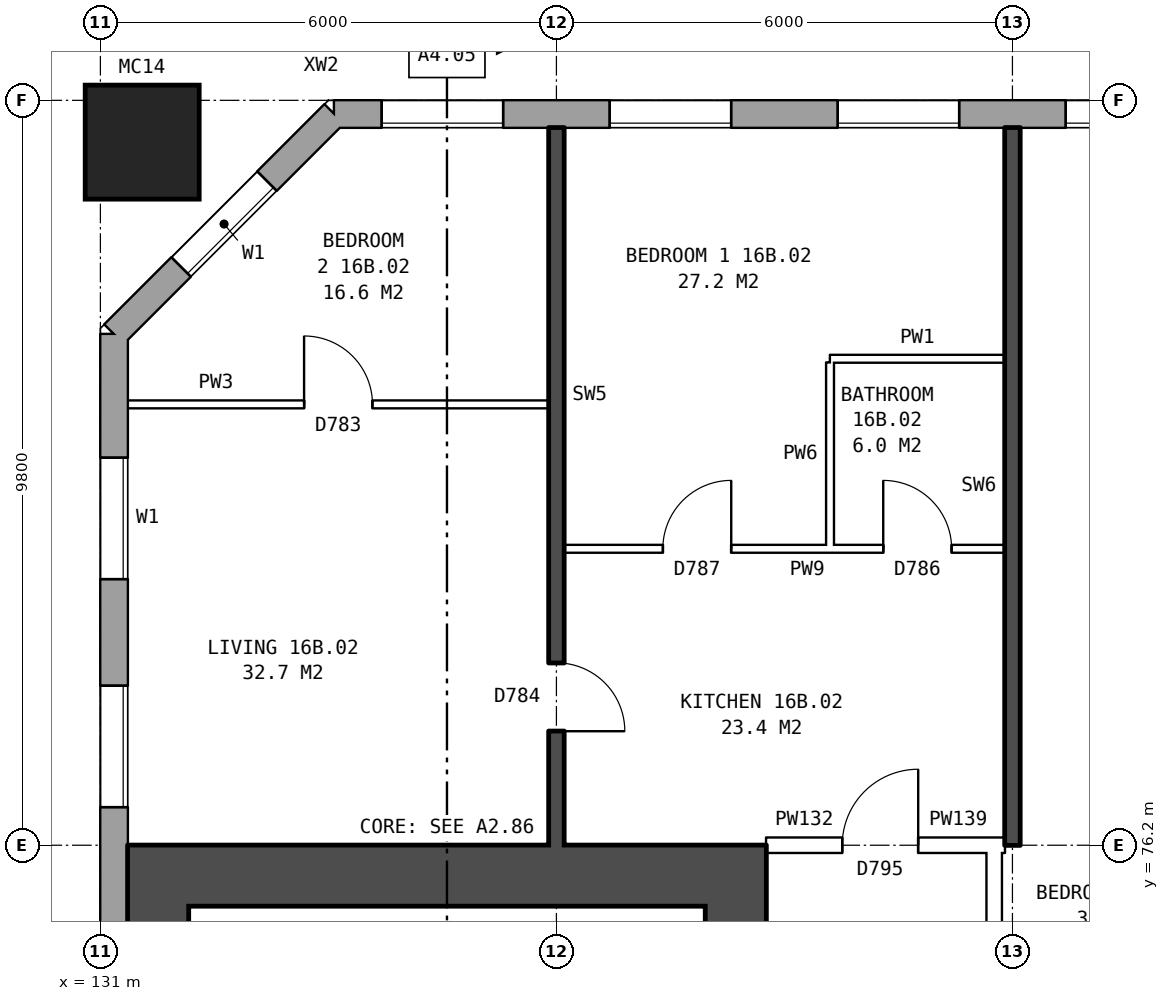
"""IFC4 building model, lengths in metres.
Left out: names, types, materials, properties, quantities, classifications, styles, units other than length and angle.
Written with IfcOpenShell. Run it as: python <this file> out.ifc"""

import sys

from ifc_helpers import new_model, si_unit, direction, frame, frame_2d, origin, origin_2d, place, context, subcontext, project, spatial, rectangle, hollow_rectangle, extrude, element, fill, save


model = new_model("IFC4")
c1 = context("Model", 3, precision=1e-05, world=origin(), true_north=direction((0.0, 1.0)))
c2 = subcontext(c1, "Body", "Model", "MODEL_VIEW")
j1 = project(units=[si_unit("LENGTHUNIT", "METRE"), si_unit("PLANEANGLEUNIT", "RADIAN")], contexts=[c1])
p1 = place(None, origin())
s1 = spatial("IfcSite", under=j1, at=p1, CompositionType="ELEMENT")
p2 = place(p1, origin())
s2 = spatial("IfcBuilding", under=s1, at=p2, CompositionType="ELEMENT")
p3 = place(p2, frame((0.0, 0.0, 59.8)))
s3 = spatial("IfcBuildingStorey", under=s2, at=p3, CompositionType="ELEMENT", Elevation=59.8)
p4 = place(p3, frame((131.55, 85.45, 0.0), z_axis=(0.0, 0.0, 1.0), x_axis=(1.0, 0.0, 0.0)))
e1 = element("IfcColumn", 1, at=p4, inside=s3, PredefinedType="COLUMN", context=c2, shape_type="SweptSolid", body=[
    extrude(hollow_rectangle(XDim=1.5, YDim=1.5, WallThickness=0.08, at=origin_2d()), origin(), (0.0, 0.0, 1.0), 3.1),
])
p5 = place(p3, frame((173.425, 85.82, 0.0), z_axis=(0.0, 0.0, 1.0), x_axis=(-1.0, 0.0, 0.0)))
e2 = element("IfcWall", 2, at=p5, inside=s3, PredefinedType="STANDARD", context=c2, shape_type="SweptSolid", body=[
    extrude(rectangle(XDim=39.351, YDim=0.36, at=frame_2d((19.675, 0.0))), origin(), (0.0, 0.0, 1.0), 2.85),
])
p6 = place(p5, frame((1.125, 0.0, 0.8)))
e3 = element("IfcOpeningElement", 3, at=p6, cuts=e2, PredefinedType="OPENING", context=c2, shape_type="SweptSolid", body=[
    extrude(rectangle(XDim=1.6, YDim=1.8, at=frame_2d((0.8, 0.9))), frame((0.0, 0.19, 0.0), z_axis=(0.0, -1.0, 0.0), x_axis=(1.0, 0.0, 0.0)), (0.0, 0.0, 1.0), 0.38),
])
p7 = place(p5, frame((4.125, 0.0, 0.8)))
e4 = element("IfcOpeningElement", 4, at=p7, cuts=e2, PredefinedType="OPENING", context=c2, shape_type="SweptSolid", body=[
    extrude(rectangle(XDim=1.6, YDim=1.8, at=frame_2d((0.8, 0.9))), frame((0.0, 0.19, 0.0), z_axis=(0.0, -1.0, 0.0), x_axis=(1.0, 0.0, 0.0)), (0.0, 0.0, 1.0), 0.38),
])
p8 = place(p5, frame((7.125, 0.0, 0.8)))
e5 = element("IfcOpeningElement", 5, at=p8, cuts=e2, PredefinedType="OPENING", context=c2, shape_type="SweptSolid", body=[
    extrude(rectangle(XDim=1.6, YDim=1.8, at=frame_2d((0.8, 0.9))), frame((0.0, 0.19, 0.0), z_axis=(0.0, -1.0, 0.0), x_axis=(1.0, 0.0, 0.0)), (0.0, 0.0, 1.0), 0.38),
])
p9 = place(p5, frame((10.125, 0.0, 0.8)))
e6 = element("IfcOpeningElement", 6, at=p9, cuts=e2, PredefinedType="OPENING", context=c2, shape_type="SweptSolid", body=[
    extrude(rectangle(XDim=1.6, YDim=1.8, at=frame_2d((0.8, 0.9))), frame((0.0, 0.19, 0.0), z_axis=(0.0, -1.0, 0.0), x_axis=(1.0, 0.0, 0.0)), (0.0, 0.0, 1.0), 0.38),
])
p10 = place(p5, frame((13.125, 0.0, 0.8)))
e7 = element("IfcOpeningElement", 7, at=p10, cuts=e2, PredefinedType="OPENING", context=c2, shape_type="SweptSolid", body=[
    extrude(rectangle(XDim=1.6, YDim=1.8, at=frame_2d((0.8, 0.9))), frame((0.0, 0.19, 0.0), z_axis=(0.0, -1.0, 0.0), x_axis=(1.0, 0.0, 0.0)), (0.0, 0.0, 1.0), 0.38),
])
p11 = place(p5, frame((15.025, 0.0, 0.8)))
e8 = element("IfcOpeningElement", 8, at=p11, cuts=e2, PredefinedType="OPENING", context=c2, shape_type="SweptSolid", body=[
    extrude(rectangle(XDim=1.0, YDim=1.8, at=frame_2d((0.5, 0.9))), frame((0.0, 0.19, 0.0), z_axis=(0.0, -1.0, 0.0), x_axis=(1.0, 0.0, 0.0)), (0.0, 0.0, 1.0), 0.38),
])
p12 = place(p5, frame((18.625, 0.0, 0.15)))
e9 = element("IfcOpeningElement", 9, at=p12, cuts=e2, PredefinedType="OPENING", context=c2, shape_type="SweptSolid", body=[
    extrude(rectangle(XDim=1.4, YDim=1.2, at=frame_2d((0.7, 0.6))), frame((0.0, 0.19, 0.0), z_axis=(0.0, -1.0, 0.0), x_axis=(1.0, 0.0, 0.0)), (0.0, 0.0, 1.0), 0.38),
])
p13 = place(p5, frame((21.575, 0.0, 1.7)))
e10 = element("IfcOpeningElement", 10, at=p13, cuts=e2, PredefinedType="OPENING", context=c2, shape_type="SweptSolid", body=[
    extrude(rectangle(XDim=0.6, YDim=0.9, at=frame_2d((0.3, 0.45))), frame((0.0, 0.19, 0.0), z_axis=(0.0, -1.0, 0.0), x_axis=(1.0, 0.0, 0.0)), (0.0, 0.0, 1.0), 0.38),
])
p14 = place(p5, frame((25.125, 0.0, 0.8)))
e11 = element("IfcOpeningElement", 11, at=p14, cuts=e2, PredefinedType="OPENING", context=c2, shape_type="SweptSolid", body=[
    extrude(rectangle(XDim=1.6, YDim=1.8, at=frame_2d((0.8, 0.9))), frame((0.0, 0.19, 0.0), z_axis=(0.0, -1.0, 0.0), x_axis=(1.0, 0.0, 0.0)), (0.0, 0.0, 1.0), 0.38),
])
p15 = place(p5, frame((28.125, 0.0, 0.8)))
e12 = element("IfcOpeningElement", 12, at=p15, cuts=e2, PredefinedType="OPENING", context=c2, shape_type="SweptSolid", body=[
    extrude(rectangle(XDim=1.6, YDim=1.8, at=frame_2d((0.8, 0.9))), frame((0.0, 0.19, 0.0), z_axis=(0.0, -1.0, 0.0), x_axis=(1.0, 0.0, 0.0)), (0.0, 0.0, 1.0), 0.38),
])
p16 = place(p5, frame((31.125, 0.0, 0.8)))
e13 = element("IfcOpeningElement", 13, at=p16, cuts=e2, PredefinedType="OPENING", context=c2, shape_type="SweptSolid", body=[
    extrude(rectangle(XDim=1.6, YDim=1.8, at=frame_2d((0.8, 0.9))), frame((0.0, 0.19, 0.0), z_axis=(0.0, -1.0, 0.0), x_axis=(1.0, 0.0, 0.0)), (0.0, 0.0, 1.0), 0.38),
])
p17 = place(p5, frame((34.125, 0.0, 0.8)))
e14 = element("IfcOpeningElement", 14, at=p17, cuts=e2, PredefinedType="OPENING", context=c2, shape_type="SweptSolid", body=[
    extrude(rectangle(XDim=1.6, YDim=1.8, at=frame_2d((0.8, 0.9))), frame((0.0, 0.19, 0.0), z_axis=(0.0, -1.0, 0.0), x_axis=(1.0, 0.0, 0.0)), (0.0, 0.0, 1.0), 0.38),
])
p18 = place(p5, frame((37.125, 0.0, 0.8)))
e15 = element("IfcOpeningElement", 15, at=p18, cuts=e2, PredefinedType="OPENING", context=c2, shape_type="SweptSolid", body=[
    extrude(rectangle(XDim=1.6, YDim=1.8, at=frame_2d((0.8, 0.9))), frame((0.0, 0.19, 0.0), z_axis=(0.0, -1.0, 0.0), x_axis=(1.0, 0.0, 0.0)), (0.0, 0.0, 1.0), 0.38),
])
p19 = place(p5, frame((16.325, 0.0, 1.0)))
e16 = element("IfcOpeningElement", 16, at=p19, cuts=e2, PredefinedType="OPENING", context=c2, shape_type="SweptSolid", body=[
    extrude(rectangle(XDim=0.6, YDim=1.5, at=frame_2d((0.3, 0.75))), frame((0.0, 0.19, 0.0), z_axis=(0.0, -1.0, 0.0), x_axis=(1.0, 0.0, 0.0)), (0.0, 0.0, 1.0), 0.38),
])
p20 = place(p5, frame((17.225, 0.0, 1.7)))
e17 = element("IfcOpeningElement", 17, at=p20, cuts=e2, PredefinedType="OPENING", context=c2, shape_type="SweptSolid", body=[
    extrude(rectangle(XDim=0.6, YDim=0.9, at=frame_2d((0.3, 0.45))), frame((0.0, 0.19, 0.0), z_axis=(0.0, -1.0, 0.0), x_axis=(1.0, 0.0, 0.0)), (0.0, 0.0, 1.0), 0.38),
])
p21 = place(p5, frame((20.325, 0.0, 0.25)))
e18 = element("IfcOpeningElement", 18, at=p21, cuts=e2, PredefinedType="OPENING", context=c2, shape_type="SweptSolid", body=[
    extrude(rectangle(XDim=0.6, YDim=0.9, at=frame_2d((0.3, 0.45))), frame((0.0, 0.19, 0.0), z_axis=(0.0, -1.0, 0.0), x_axis=(1.0, 0.0, 0.0)), (0.0, 0.0, 1.0), 0.38),
])
p22 = place(p5, frame((22.625, 0.0, 0.8)))
e19 = element("IfcOpeningElement", 19, at=p22, cuts=e2, PredefinedType="OPENING", context=c2, shape_type="SweptSolid", body=[
    extrude(rectangle(XDim=1.6, YDim=1.8, at=frame_2d((0.8, 0.9))), frame((0.0, 0.19, 0.0), z_axis=(0.0, -1.0, 0.0), x_axis=(1.0, 0.0, 0.0)), (0.0, 0.0, 1.0), 0.38),
])
p23 = place(p3, frame((134.075, 85.82, 0.0), z_axis=(0.0, 0.0, 1.0), x_axis=(-0.707106781187, -0.707106781187, 0.0)))
e20 = element("IfcWall", 20, at=p23, inside=s3, PredefinedType="STANDARD", context=c2, shape_type="SweptSolid", body=[
    extrude(rectangle(XDim=4.094, YDim=0.36, at=frame_2d((2.047, 0.0))), origin(), (0.0, 0.0, 1.0), 2.85),
])
p24 = place(p23, frame((1.247, 0.0, 0.8)))
e21 = element("IfcOpeningElement", 21, at=p24, cuts=e20, PredefinedType="OPENING", context=c2, shape_type="SweptSolid", body=[
    extrude(rectangle(XDim=1.6, YDim=1.8, at=frame_2d((0.8, 0.9))), frame((0.0, 0.19, 0.0), z_axis=(0.0, -1.0, 0.0), x_axis=(1.0, 0.0, 0.0)), (0.0, 0.0, 1.0), 0.38),
])
p25 = place(p3, frame((131.18, 82.925, 0.0), z_axis=(0.0, 0.0, 1.0), x_axis=(0.0, -1.0, 0.0)))
e22 = element("IfcWall", 22, at=p25, inside=s3, PredefinedType="STANDARD", context=c2, shape_type="SweptSolid", body=[
    extrude(rectangle(XDim=25.851, YDim=0.36, at=frame_2d((12.925, 0.0))), origin(), (0.0, 0.0, 1.0), 2.85),
])
p26 = place(p25, frame((1.625, 0.0, 0.8)))
e23 = element("IfcOpeningElement", 23, at=p26, cuts=e22, PredefinedType="OPENING", context=c2, shape_type="SweptSolid", body=[
    extrude(rectangle(XDim=1.6, YDim=1.8, at=frame_2d((0.8, 0.9))), frame((0.0, 0.19, 0.0), z_axis=(0.0, -1.0, 0.0), x_axis=(1.0, 0.0, 0.0)), (0.0, 0.0, 1.0), 0.38),
])
p27 = place(p25, frame((4.625, 0.0, 0.8)))
e24 = element("IfcOpeningElement", 24, at=p27, cuts=e22, PredefinedType="OPENING", context=c2, shape_type="SweptSolid", body=[
    extrude(rectangle(XDim=1.6, YDim=1.8, at=frame_2d((0.8, 0.9))), frame((0.0, 0.19, 0.0), z_axis=(0.0, -1.0, 0.0), x_axis=(1.0, 0.0, 0.0)), (0.0, 0.0, 1.0), 0.38),
])
p28 = place(p25, frame((19.625, 0.0, 0.8)))
e25 = element("IfcOpeningElement", 25, at=p28, cuts=e22, PredefinedType="OPENING", context=c2, shape_type="SweptSolid", body=[
    extrude(rectangle(XDim=1.6, YDim=1.8, at=frame_2d((0.8, 0.9))), frame((0.0, 0.19, 0.0), z_axis=(0.0, -1.0, 0.0), x_axis=(1.0, 0.0, 0.0)), (0.0, 0.0, 1.0), 0.38),
])
p29 = place(p25, frame((22.625, 0.0, 0.8)))
e26 = element("IfcOpeningElement", 26, at=p29, cuts=e22, PredefinedType="OPENING", context=c2, shape_type="SweptSolid", body=[
    extrude(rectangle(XDim=1.6, YDim=1.8, at=frame_2d((0.8, 0.9))), frame((0.0, 0.19, 0.0), z_axis=(0.0, -1.0, 0.0), x_axis=(1.0, 0.0, 0.0)), (0.0, 0.0, 1.0), 0.38),
])
p30 = place(p3, frame((139.36, 64.6, 0.0), z_axis=(0.0, 0.0, 1.0), x_axis=(0.0, 1.0, 0.0)))
e27 = element("IfcWall", 27, at=p30, inside=s3, PredefinedType="SHEAR", context=c2, shape_type="SweptSolid", body=[
    extrude(rectangle(XDim=10.8, YDim=0.8, at=frame_2d((5.4, 0.0))), origin(), (0.0, 0.0, 1.0), 2.85),
])
p31 = place(p30, frame((0.525, 0.0, 0.0)))
e28 = element("IfcOpeningElement", 28, at=p31, cuts=e27, PredefinedType="OPENING", context=c2, shape_type="SweptSolid", body=[
    extrude(rectangle(XDim=1.1, YDim=2.1, at=frame_2d((0.55, 1.05))), frame((0.0, 0.41, 0.0), z_axis=(0.0, -1.0, 0.0), x_axis=(1.0, 0.0, 0.0)), (0.0, 0.0, 1.0), 0.82),
])
p32 = place(p30, frame((9.1, 0.0, 0.0)))
e29 = element("IfcOpeningElement", 29, at=p32, cuts=e27, PredefinedType="OPENING", context=c2, shape_type="SweptSolid", body=[
    extrude(rectangle(XDim=1.1, YDim=2.1, at=frame_2d((0.55, 1.05))), frame((0.0, 0.41, 0.0), z_axis=(0.0, -1.0, 0.0), x_axis=(1.0, 0.0, 0.0)), (0.0, 0.0, 1.0), 0.82),
])
p33 = place(p30, frame((7.325, 0.0, 0.0)))
e30 = element("IfcOpeningElement", 30, at=p33, cuts=e27, PredefinedType="OPENING", context=c2, shape_type="SweptSolid", body=[
    extrude(rectangle(XDim=0.85, YDim=2.1, at=frame_2d((0.425, 1.05))), frame((0.0, 0.41, 0.0), z_axis=(0.0, -1.0, 0.0), x_axis=(1.0, 0.0, 0.0)), (0.0, 0.0, 1.0), 0.82),
])
p34 = place(p3, frame((131.76, 64.6, 0.0), z_axis=(0.0, 0.0, 1.0), x_axis=(0.0, 1.0, 0.0)))
e31 = element("IfcWall", 31, at=p34, inside=s3, PredefinedType="SHEAR", context=c2, shape_type="SweptSolid", body=[
    extrude(rectangle(XDim=10.8, YDim=0.8, at=frame_2d((5.4, 0.0))), origin(), (0.0, 0.0, 1.0), 2.85),
])
p35 = place(p3, frame((139.76, 75.8, 0.0), z_axis=(0.0, 0.0, 1.0), x_axis=(-1.0, 0.0, 0.0)))
e32 = element("IfcWall", 32, at=p35, inside=s3, PredefinedType="SHEAR", context=c2, shape_type="SweptSolid", body=[
    extrude(rectangle(XDim=8.4, YDim=0.8, at=frame_2d((4.2, 0.0))), origin(), (0.0, 0.0, 1.0), 2.85),
])
p36 = place(p3, frame((142.76, 63.9, 0.0), z_axis=(0.0, 0.0, 1.0), x_axis=(0.0, 1.0, 0.0)))
e33 = element("IfcWall", 33, at=p36, inside=s3, PredefinedType="PARTITIONING", context=c2, shape_type="SweptSolid", body=[
    extrude(rectangle(XDim=12.2, YDim=0.2, at=frame_2d((6.1, 0.0))), origin(), (0.0, 0.0, 1.0), 2.85),
])
p37 = place(p36, frame((5.1, 0.0, 0.0)))
e34 = element("IfcOpeningElement", 34, at=p37, cuts=e33, PredefinedType="OPENING", context=c2, shape_type="SweptSolid", body=[
    extrude(rectangle(XDim=2.0, YDim=2.1, at=frame_2d((1.0, 1.05))), frame((0.0, 0.11, 0.0), z_axis=(0.0, -1.0, 0.0), x_axis=(1.0, 0.0, 0.0)), (0.0, 0.0, 1.0), 0.22),
])
p38 = place(p3, frame((139.76, 76.2, 0.0), z_axis=(0.0, 0.0, 1.0), x_axis=(1.0, 0.0, 0.0)))
e35 = element("IfcWall", 35, at=p38, inside=s3, PredefinedType="PARTITIONING", context=c2, shape_type="SweptSolid", body=[
    extrude(rectangle(XDim=3.0, YDim=0.2, at=frame_2d((1.5, 0.0))), origin(), (0.0, 0.0, 1.0), 2.85),
])
p39 = place(p38, frame((1.0, 0.0, 0.0)))
e36 = element("IfcOpeningElement", 36, at=p39, cuts=e35, PredefinedType="OPENING", context=c2, shape_type="SweptSolid", body=[
    extrude(rectangle(XDim=1.0, YDim=2.1, at=frame_2d((0.5, 1.05))), frame((0.0, 0.11, 0.0), z_axis=(0.0, -1.0, 0.0), x_axis=(1.0, 0.0, 0.0)), (0.0, 0.0, 1.0), 0.22),
])
p40 = place(p3, frame((142.76, 76.2, 0.0), z_axis=(0.0, 0.0, 1.0), x_axis=(1.0, 0.0, 0.0)))
e37 = element("IfcWall", 37, at=p40, inside=s3, PredefinedType="PARTITIONING", context=c2, shape_type="SweptSolid", body=[
    extrude(rectangle(XDim=0.14, YDim=0.2, at=frame_2d((0.07, 0.0))), origin(), (0.0, 0.0, 1.0), 2.85),
])
p41 = place(p3, frame((137.1, 80.1, 0.0), z_axis=(0.0, 0.0, 1.0), x_axis=(1.0, 0.0, 0.0)))
e38 = element("IfcWall", 38, at=p41, inside=s3, PredefinedType="PARTITIONING", context=c2, shape_type="SweptSolid", body=[
    extrude(rectangle(XDim=5.8, YDim=0.1, at=frame_2d((2.9, 0.0))), origin(), (0.0, 0.0, 1.0), 2.85),
])
p42 = place(p41, frame((1.3, 0.0, 0.0)))
e39 = element("IfcOpeningElement", 39, at=p42, cuts=e38, PredefinedType="OPENING", context=c2, shape_type="SweptSolid", body=[
    extrude(rectangle(XDim=0.9, YDim=2.1, at=frame_2d((0.45, 1.05))), frame((0.0, 0.06, 0.0), z_axis=(0.0, -1.0, 0.0), x_axis=(1.0, 0.0, 0.0)), (0.0, 0.0, 1.0), 0.12),
])
p43 = place(p41, frame((4.2, 0.0, 0.0)))
e40 = element("IfcOpeningElement", 40, at=p43, cuts=e38, PredefinedType="OPENING", context=c2, shape_type="SweptSolid", body=[
    extrude(rectangle(XDim=0.9, YDim=2.1, at=frame_2d((0.45, 1.05))), frame((0.0, 0.06, 0.0), z_axis=(0.0, -1.0, 0.0), x_axis=(1.0, 0.0, 0.0)), (0.0, 0.0, 1.0), 0.12),
])
p44 = place(p3, frame((131.36, 82.0, 0.0), z_axis=(0.0, 0.0, 1.0), x_axis=(1.0, 0.0, 0.0)))
e41 = element("IfcWall", 41, at=p44, inside=s3, PredefinedType="PARTITIONING", context=c2, shape_type="SweptSolid", body=[
    extrude(rectangle(XDim=5.54, YDim=0.1, at=frame_2d((2.77, 0.0))), origin(), (0.0, 0.0, 1.0), 2.85),
])
p45 = place(p44, frame((2.32, 0.0, 0.0)))
e42 = element("IfcOpeningElement", 42, at=p45, cuts=e41, PredefinedType="OPENING", context=c2, shape_type="SweptSolid", body=[
    extrude(rectangle(XDim=0.9, YDim=2.1, at=frame_2d((0.45, 1.05))), frame((0.0, 0.06, 0.0), z_axis=(0.0, -1.0, 0.0), x_axis=(1.0, 0.0, 0.0)), (0.0, 0.0, 1.0), 0.12),
])
p46 = place(p3, frame((140.6, 82.6, 0.0), z_axis=(0.0, 0.0, 1.0), x_axis=(1.0, 0.0, 0.0)))
e43 = element("IfcWall", 43, at=p46, inside=s3, PredefinedType="PARTITIONING", context=c2, shape_type="SweptSolid", body=[
    extrude(rectangle(XDim=2.3, YDim=0.1, at=frame_2d((1.15, 0.0))), origin(), (0.0, 0.0, 1.0), 2.85),
])
p47 = place(p3, frame((137.0, 76.2, 0.0), z_axis=(0.0, 0.0, 1.0), x_axis=(0.0, 1.0, 0.0)))
e44 = element("IfcWall", 44, at=p47, inside=s3, PredefinedType="SOLIDWALL", context=c2, shape_type="SweptSolid", body=[
    extrude(rectangle(XDim=9.44, YDim=0.2, at=frame_2d((4.72, 0.0))), origin(), (0.0, 0.0, 1.0), 2.85),
])
p48 = place(p47, frame((1.5, 0.0, 0.0)))
e45 = element("IfcOpeningElement", 45, at=p48, cuts=e44, PredefinedType="OPENING", context=c2, shape_type="SweptSolid", body=[
    extrude(rectangle(XDim=0.9, YDim=2.1, at=frame_2d((0.45, 1.05))), frame((0.0, 0.11, 0.0), z_axis=(0.0, -1.0, 0.0), x_axis=(1.0, 0.0, 0.0)), (0.0, 0.0, 1.0), 0.22),
])
p49 = place(p3, frame((140.6, 80.15, 0.0), z_axis=(0.0, 0.0, 1.0), x_axis=(0.0, 1.0, 0.0)))
e46 = element("IfcWall", 46, at=p49, inside=s3, PredefinedType="PARTITIONING", context=c2, shape_type="SweptSolid", body=[
    extrude(rectangle(XDim=2.4, YDim=0.1, at=frame_2d((1.2, 0.0))), origin(), (0.0, 0.0, 1.0), 2.85),
])
p50 = place(p3, frame((143.0, 76.2, 0.0), z_axis=(0.0, 0.0, 1.0), x_axis=(0.0, 1.0, 0.0)))
e47 = element("IfcWall", 47, at=p50, inside=s3, PredefinedType="SOLIDWALL", context=c2, shape_type="SweptSolid", body=[
    extrude(rectangle(XDim=9.44, YDim=0.2, at=frame_2d((4.72, 0.0))), origin(), (0.0, 0.0, 1.0), 2.85),
])
p51 = place(p15, origin())
e48 = element("IfcWindow", 48, at=p51, inside=s3, PartitioningType="SINGLE_PANEL", PredefinedType="WINDOW", context=c2, shape_type="SweptSolid", body=[
    extrude(rectangle(XDim=1.6, YDim=1.8, at=frame_2d((0.8, 0.9))), frame((0.0, 0.15, 0.0), z_axis=(0.0, -1.0, 0.0), x_axis=(1.0, 0.0, 0.0)), (0.0, 0.0, 1.0), 0.06),
])
fill(e12, e48)
p52 = place(p16, origin())
e49 = element("IfcWindow", 49, at=p52, inside=s3, PartitioningType="SINGLE_PANEL", PredefinedType="WINDOW", context=c2, shape_type="SweptSolid", body=[
    extrude(rectangle(XDim=1.6, YDim=1.8, at=frame_2d((0.8, 0.9))), frame((0.0, 0.15, 0.0), z_axis=(0.0, -1.0, 0.0), x_axis=(1.0, 0.0, 0.0)), (0.0, 0.0, 1.0), 0.06),
])
fill(e13, e49)
p53 = place(p17, origin())
e50 = element("IfcWindow", 50, at=p53, inside=s3, PartitioningType="SINGLE_PANEL", PredefinedType="WINDOW", context=c2, shape_type="SweptSolid", body=[
    extrude(rectangle(XDim=1.6, YDim=1.8, at=frame_2d((0.8, 0.9))), frame((0.0, 0.15, 0.0), z_axis=(0.0, -1.0, 0.0), x_axis=(1.0, 0.0, 0.0)), (0.0, 0.0, 1.0), 0.06),
])
fill(e14, e50)
p54 = place(p18, origin())
e51 = element("IfcWindow", 51, at=p54, inside=s3, PartitioningType="SINGLE_PANEL", PredefinedType="WINDOW", context=c2, shape_type="SweptSolid", body=[
    extrude(rectangle(XDim=1.6, YDim=1.8, at=frame_2d((0.8, 0.9))), frame((0.0, 0.15, 0.0), z_axis=(0.0, -1.0, 0.0), x_axis=(1.0, 0.0, 0.0)), (0.0, 0.0, 1.0), 0.06),
])
fill(e15, e51)
p55 = place(p24, origin())
e52 = element("IfcWindow", 52, at=p55, inside=s3, PartitioningType="SINGLE_PANEL", PredefinedType="WINDOW", context=c2, shape_type="SweptSolid", body=[
    extrude(rectangle(XDim=1.6, YDim=1.8, at=frame_2d((0.8, 0.9))), frame((0.0, 0.15, 0.0), z_axis=(0.0, -1.0, 0.0), x_axis=(1.0, 0.0, 0.0)), (0.0, 0.0, 1.0), 0.06),
])
fill(e21, e52)
p56 = place(p26, origin())
e53 = element("IfcWindow", 53, at=p56, inside=s3, PartitioningType="SINGLE_PANEL", PredefinedType="WINDOW", context=c2, shape_type="SweptSolid", body=[
    extrude(rectangle(XDim=1.6, YDim=1.8, at=frame_2d((0.8, 0.9))), frame((0.0, 0.15, 0.0), z_axis=(0.0, -1.0, 0.0), x_axis=(1.0, 0.0, 0.0)), (0.0, 0.0, 1.0), 0.06),
])
fill(e23, e53)
p57 = place(p27, origin())
e54 = element("IfcWindow", 54, at=p57, inside=s3, PartitioningType="SINGLE_PANEL", PredefinedType="WINDOW", context=c2, shape_type="SweptSolid", body=[
    extrude(rectangle(XDim=1.6, YDim=1.8, at=frame_2d((0.8, 0.9))), frame((0.0, 0.15, 0.0), z_axis=(0.0, -1.0, 0.0), x_axis=(1.0, 0.0, 0.0)), (0.0, 0.0, 1.0), 0.06),
])
fill(e24, e54)
p58 = place(p42, origin())
e55 = element("IfcDoor", 55, at=p58, inside=s3, OperationType="SINGLE_SWING_RIGHT", PredefinedType="DOOR", context=c2, shape_type="SweptSolid", body=[
    extrude(rectangle(XDim=0.9, YDim=2.1, at=frame_2d((0.45, 1.05))), frame((0.0, 0.025, 0.0), z_axis=(0.0, -1.0, 0.0), x_axis=(1.0, 0.0, 0.0)), (0.0, 0.0, 1.0), 0.05),
])
fill(e39, e55)
p59 = place(p45, origin())
e56 = element("IfcDoor", 56, at=p59, inside=s3, OperationType="SINGLE_SWING_LEFT", PredefinedType="DOOR", context=c2, shape_type="SweptSolid", body=[
    extrude(rectangle(XDim=0.9, YDim=2.1, at=frame_2d((0.45, 1.05))), frame((0.0, 0.025, 0.0), z_axis=(0.0, -1.0, 0.0), x_axis=(1.0, 0.0, 0.0)), (0.0, 0.0, 1.0), 0.05),
])
fill(e42, e56)
p60 = place(p39, origin())
e57 = element("IfcDoor", 57, at=p60, inside=s3, OperationType="SINGLE_SWING_RIGHT", PredefinedType="DOOR", context=c2, shape_type="SweptSolid", body=[
    extrude(rectangle(XDim=1.0, YDim=2.1, at=frame_2d((0.5, 1.05))), frame((0.0, 0.025, 0.0), z_axis=(0.0, -1.0, 0.0), x_axis=(1.0, 0.0, 0.0)), (0.0, 0.0, 1.0), 0.05),
])
fill(e36, e57)
p61 = place(p48, frame((0.9, 0.0, 0.0), z_axis=(0.0, 0.0, 1.0), x_axis=(-1.0, 0.0, 0.0)))
e58 = element("IfcDoor", 58, at=p61, inside=s3, OperationType="SINGLE_SWING_RIGHT", PredefinedType="DOOR", context=c2, shape_type="SweptSolid", body=[
    extrude(rectangle(XDim=0.9, YDim=2.1, at=frame_2d((0.45, 1.05))), frame((0.0, 0.025, 0.0), z_axis=(0.0, -1.0, 0.0), x_axis=(1.0, 0.0, 0.0)), (0.0, 0.0, 1.0), 0.05),
])
fill(e45, e58)
p62 = place(p43, origin())
e59 = element("IfcDoor", 59, at=p62, inside=s3, OperationType="SINGLE_SWING_LEFT", PredefinedType="DOOR", context=c2, shape_type="SweptSolid", body=[
    extrude(rectangle(XDim=0.9, YDim=2.1, at=frame_2d((0.45, 1.05))), frame((0.0, 0.025, 0.0), z_axis=(0.0, -1.0, 0.0), x_axis=(1.0, 0.0, 0.0)), (0.0, 0.0, 1.0), 0.05),
])
fill(e40, e59)
save(model, sys.argv[1])
